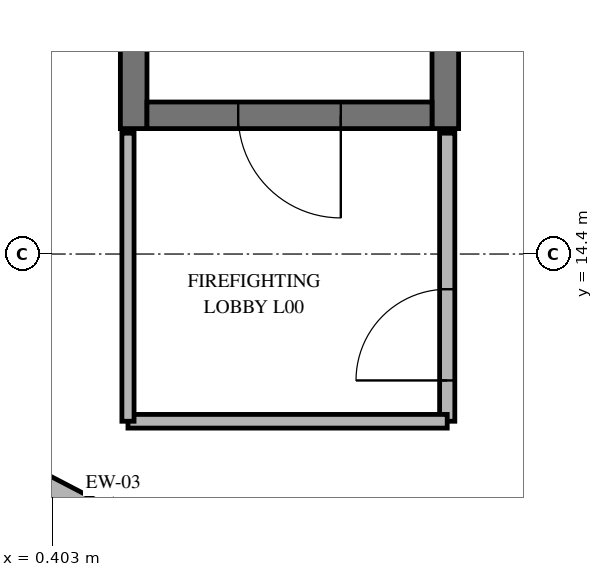
"""IFC4 building model, lengths in metres.
Left out: names, types, materials, properties, quantities, classifications, styles, units other than length and angle.
Written with IfcOpenShell. Run it as: python <this file> out.ifc"""

import sys

from ifc_helpers import new_model, si_unit, direction, frame, frame_2d, origin, place, context, subcontext, project, spatial, rectangle, extrude, element, fill, save


model = new_model("IFC4")
c1 = context("Model", 3, precision=1e-05, world=origin(), true_north=direction((0.0, 1.0)))
c2 = subcontext(c1, "Body", "Model", "MODEL_VIEW")
j1 = project(units=[si_unit("LENGTHUNIT", "METRE"), si_unit("PLANEANGLEUNIT", "RADIAN")], contexts=[c1])
p1 = place(None, origin())
s1 = spatial("IfcSite", under=j1, at=p1, CompositionType="ELEMENT")
p2 = place(p1, origin())
s2 = spatial("IfcBuilding", under=s1, at=p2, CompositionType="ELEMENT")
p3 = place(p2, origin())
s3 = spatial("IfcBuildingStorey", under=s2, at=p3, CompositionType="ELEMENT", Elevation=0.0)
p4 = place(p3, frame((2.467, 10.233, 0.0), z_axis=(0.0, 0.0, 1.0), x_axis=(-0.88701246436, 0.46174547975, 0.0)))
e1 = element("IfcWall", 1, at=p4, inside=s3, PredefinedType="SOLIDWALL", context=c2, shape_type="SweptSolid", body=[
    extrude(rectangle(XDim=2.838, YDim=0.28, at=frame_2d((1.419, 0.0))), origin(), (0.0, 0.0, 1.0), 3.59),
])
p5 = place(p4, frame((0.969, 0.0, 0.9)))
e2 = element("IfcOpeningElement", 2, at=p5, cuts=e1, PredefinedType="OPENING", context=c2, shape_type="SweptSolid", body=[
    extrude(rectangle(XDim=0.9, YDim=1.2, at=frame_2d((0.45, 0.6))), frame((0.0, 0.15, 0.0), z_axis=(0.0, -1.0, 0.0), x_axis=(1.0, 0.0, 0.0)), (0.0, 0.0, 1.0), 0.3),
])
for number, where, z_axis, x_axis in (
    (3, (5.575, 16.05, 0.0), (0.0, 0.0, 1.0), (0.0, 1.0, 0.0)),
    (4, (1.475, 25.15, 0.0), (0.0, 0.0, 1.0), (0.0, -1.0, 0.0)),
):
    element("IfcWall", number, at=place(p3, frame(where, z_axis=z_axis, x_axis=x_axis)), inside=s3, PredefinedType="SHEAR", context=c2, shape_type="SweptSolid", body=[
        extrude(rectangle(XDim=9.1, YDim=0.35, at=frame_2d((4.55, 0.0))), origin(), (0.0, 0.0, 1.0), 4.24),
    ])
p6 = place(p3, frame((5.4, 16.225, 0.0), z_axis=(0.0, 0.0, 1.0), x_axis=(-1.0, 0.0, 0.0)))
e5 = element("IfcWall", 5, at=p6, inside=s3, PredefinedType="SHEAR", context=c2, shape_type="SweptSolid", body=[
    extrude(rectangle(XDim=3.75, YDim=0.35, at=frame_2d((1.875, 0.0))), origin(), (0.0, 0.0, 1.0), 4.24),
])
p7 = place(p6, frame((1.2, 0.0, 0.0)))
e6 = element("IfcOpeningElement", 6, at=p7, cuts=e5, PredefinedType="OPENING", context=c2, shape_type="SweptSolid", body=[
    extrude(rectangle(XDim=1.35, YDim=2.2, at=frame_2d((0.675, 1.1))), frame((0.0, 0.185, 0.0), z_axis=(0.0, -1.0, 0.0), x_axis=(1.0, 0.0, 0.0)), (0.0, 0.0, 1.0), 0.37),
])
p8 = place(p3, frame((5.6, 12.2, 0.0), z_axis=(0.0, 0.0, 1.0), x_axis=(0.0, 1.0, 0.0)))
e7 = element("IfcWall", 7, at=p8, inside=s3, PredefinedType="PARTITIONING", context=c2, shape_type="SweptSolid", body=[
    extrude(rectangle(XDim=3.79, YDim=0.2, at=frame_2d((1.895, 0.0))), origin(), (0.0, 0.0, 1.0), 3.44),
])
p9 = place(p8, frame((0.537, 0.0, 0.0)))
e8 = element("IfcOpeningElement", 8, at=p9, cuts=e7, PredefinedType="OPENING", context=c2, shape_type="SweptSolid", body=[
    extrude(rectangle(XDim=1.2, YDim=2.2, at=frame_2d((0.6, 1.1))), frame((0.0, 0.11, 0.0), z_axis=(0.0, -1.0, 0.0), x_axis=(1.0, 0.0, 0.0)), (0.0, 0.0, 1.0), 0.22),
])
p10 = place(p3, frame((1.4, 12.2, 0.0), z_axis=(0.0, 0.0, 1.0), x_axis=(1.0, 0.0, 0.0)))
e9 = element("IfcWall", 9, at=p10, inside=s3, PredefinedType="PARTITIONING", context=c2, shape_type="SweptSolid", body=[
    extrude(rectangle(XDim=4.2, YDim=0.18, at=frame_2d((2.1, 0.0))), origin(), (0.0, 0.0, 1.0), 4.24),
])
p11 = place(p3, frame((1.4, 15.99, 0.0), z_axis=(0.0, 0.0, 1.0), x_axis=(0.0, -1.0, 0.0)))
e10 = element("IfcWall", 10, at=p11, inside=s3, PredefinedType="PARTITIONING", context=c2, shape_type="SweptSolid", body=[
    extrude(rectangle(XDim=3.79, YDim=0.16, at=frame_2d((1.895, 0.0))), origin(), (0.0, 0.0, 1.0), 3.44),
])
p12 = place(p7, origin())
e11 = element("IfcDoor", 11, at=p12, inside=s3, OperationType="SINGLE_SWING_LEFT", PredefinedType="DOOR", context=c2, shape_type="SweptSolid", body=[
    extrude(rectangle(XDim=1.35, YDim=2.2, at=frame_2d((0.675, 1.1))), frame((0.0, 0.025, 0.0), z_axis=(0.0, -1.0, 0.0), x_axis=(1.0, 0.0, 0.0)), (0.0, 0.0, 1.0), 0.05),
])
fill(e6, e11)
p13 = place(p9, origin())
e12 = element("IfcDoor", 12, at=p13, inside=s3, OperationType="SINGLE_SWING_LEFT", PredefinedType="DOOR", context=c2, shape_type="SweptSolid", body=[
    extrude(rectangle(XDim=1.2, YDim=2.2, at=frame_2d((0.6, 1.1))), frame((0.0, 0.025, 0.0), z_axis=(0.0, -1.0, 0.0), x_axis=(1.0, 0.0, 0.0)), (0.0, 0.0, 1.0), 0.05),
])
fill(e8, e12)
save(model, sys.argv[1])
